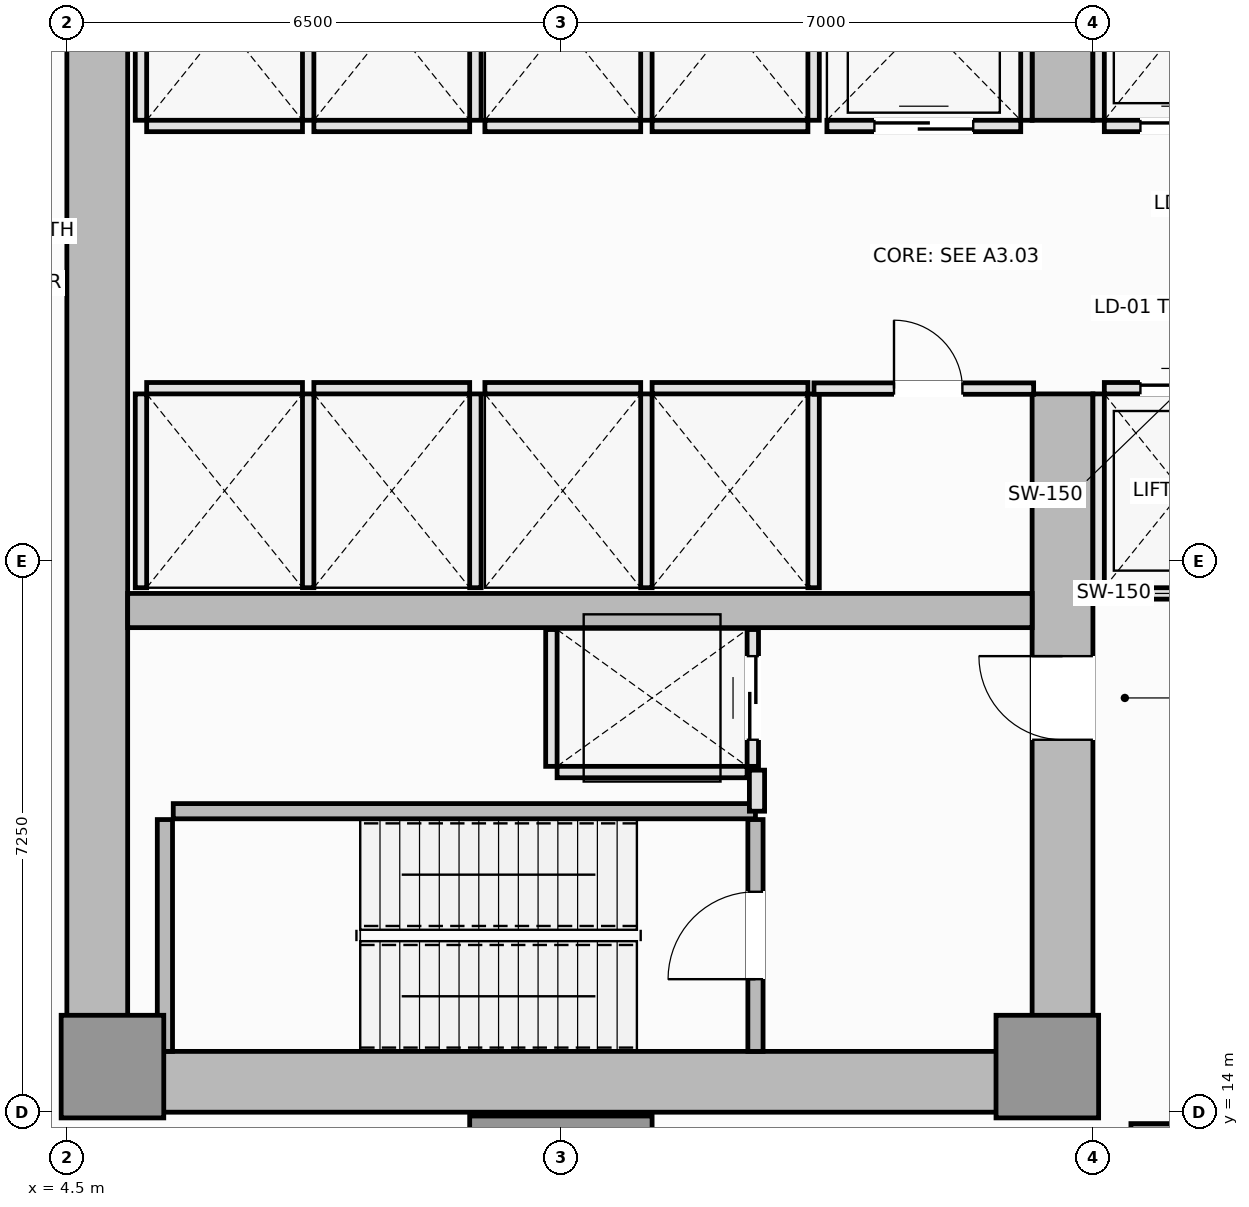
"""IFC4 building model, lengths in metres.
Left out: names, types, materials, properties, quantities, classifications, styles, units other than length and angle.
Written with IfcOpenShell. Run it as: python <this file> out.ifc"""

import sys

from ifc_helpers import new_model, si_unit, direction, frame, frame_2d, origin, origin_2d, place, context, subcontext, project, spatial, rectangle, extrude, element, fill, save


model = new_model("IFC4")
c1 = context("Model", 3, precision=1e-05, world=origin(), true_north=direction((0.0, 1.0)))
c2 = subcontext(c1, "Body", "Model", "MODEL_VIEW")
j1 = project(units=[si_unit("LENGTHUNIT", "METRE"), si_unit("PLANEANGLEUNIT", "RADIAN")], contexts=[c1])
p1 = place(None, origin())
s1 = spatial("IfcSite", under=j1, at=p1, CompositionType="ELEMENT")
p2 = place(p1, origin())
s2 = spatial("IfcBuilding", under=s1, at=p2, CompositionType="ELEMENT")
p3 = place(p2, frame((0.0, 0.0, 15.6)))
s3 = spatial("IfcBuildingStorey", under=s2, at=p3, CompositionType="ELEMENT", Elevation=15.6)
p4 = place(p3, frame((4.5, 14.4, 0.0), z_axis=(0.0, 0.0, 1.0), x_axis=(1.0, 0.0, 0.0)))
e1 = element("IfcWall", 1, at=p4, inside=s3, PredefinedType="SHEAR", context=c2, shape_type="SweptSolid", body=[
    extrude(rectangle(XDim=13.5, YDim=0.8, at=frame_2d((6.75, 0.0))), origin(), (0.0, 0.0, 1.0), 4.8),
])
p5 = place(p3, frame((4.9, 14.8, 0.0), z_axis=(0.0, 0.0, 1.0), x_axis=(0.0, 1.0, 0.0)))
e2 = element("IfcWall", 2, at=p5, inside=s3, PredefinedType="SHEAR", context=c2, shape_type="SweptSolid", body=[
    extrude(rectangle(XDim=20.9, YDim=0.8, at=frame_2d((10.45, 0.0))), origin(), (0.0, 0.0, 1.0), 4.8),
])
p6 = place(p3, frame((17.6, 14.8, 0.0), z_axis=(0.0, 0.0, 1.0), x_axis=(0.0, 1.0, 0.0)))
e3 = element("IfcWall", 3, at=p6, inside=s3, PredefinedType="SHEAR", context=c2, shape_type="SweptSolid", body=[
    extrude(rectangle(XDim=8.65, YDim=0.8, at=frame_2d((4.325, 0.0))), origin(), (0.0, 0.0, 1.0), 4.8),
])
p7 = place(p6, frame((4.1, 0.0, 0.0)))
e4 = element("IfcOpeningElement", 4, at=p7, cuts=e3, PredefinedType="OPENING", context=c2, shape_type="SweptSolid", body=[
    extrude(rectangle(XDim=1.1, YDim=2.15, at=frame_2d((0.55, 1.075))), frame((0.0, 0.41, 0.0), z_axis=(0.0, -1.0, 0.0), x_axis=(1.0, 0.0, 0.0)), (0.0, 0.0, 1.0), 0.82),
])
p8 = place(p3, frame((17.6, 27.05, 0.0), z_axis=(0.0, 0.0, 1.0), x_axis=(0.0, 1.0, 0.0)))
e5 = element("IfcWall", 5, at=p8, inside=s3, PredefinedType="SHEAR", context=c2, shape_type="SweptSolid", body=[
    extrude(rectangle(XDim=8.65, YDim=0.8, at=frame_2d((4.325, 0.0))), origin(), (0.0, 0.0, 1.0), 4.8),
])
p9 = place(p8, frame((3.45, 0.0, 0.0)))
e6 = element("IfcOpeningElement", 6, at=p9, cuts=e5, PredefinedType="OPENING", context=c2, shape_type="SweptSolid", body=[
    extrude(rectangle(XDim=1.1, YDim=2.15, at=frame_2d((0.55, 1.075))), frame((0.0, 0.41, 0.0), z_axis=(0.0, -1.0, 0.0), x_axis=(1.0, 0.0, 0.0)), (0.0, 0.0, 1.0), 0.82),
])
p10 = place(p3, frame((5.3, 20.6, 0.0), z_axis=(0.0, 0.0, 1.0), x_axis=(1.0, 0.0, 0.0)))
e7 = element("IfcWall", 7, at=p10, inside=s3, PredefinedType="SHEAR", context=c2, shape_type="SweptSolid", body=[
    extrude(rectangle(XDim=11.9, YDim=0.45, at=frame_2d((5.95, 0.0))), origin(), (0.0, 0.0, 1.0), 4.8),
])
for number, where, z_axis, x_axis in (
    (8, (5.1, 14.6, 0.0), (0.0, 0.0, 1.0), (1.0, 0.0, 0.0)),
    (9, (17.4, 14.6, 0.0), (0.0, 0.0, 1.0), (1.0, 0.0, 0.0)),
):
    element("IfcColumn", number, at=place(p3, frame(where, z_axis=z_axis, x_axis=x_axis)), inside=s3, PredefinedType="PILASTER", context=c2, shape_type="SweptSolid", body=[
        extrude(rectangle(XDim=1.35, YDim=1.35, at=origin_2d()), origin(), (0.0, 0.0, 1.0), 4.8),
    ])
p11 = place(p3, frame((11.0, 12.75, 0.0), z_axis=(0.0, 0.0, 1.0), x_axis=(1.0, 0.0, 0.0)))
e10 = element("IfcColumn", 10, at=p11, inside=s3, PredefinedType="COLUMN", context=c2, shape_type="SweptSolid", body=[
    extrude(rectangle(XDim=2.4, YDim=2.4, at=origin_2d()), origin(), (0.0, 0.0, 1.0), 4.8),
])
p12 = place(p3, frame((19.8, 12.75, 0.0), z_axis=(0.0, 0.0, 1.0), x_axis=(1.0, 0.0, 0.0)))
e11 = element("IfcColumn", 11, at=p12, inside=s3, PredefinedType="COLUMN", context=c2, shape_type="SweptSolid", body=[
    extrude(rectangle(XDim=2.6, YDim=2.2, at=origin_2d()), origin(), (0.0, 0.0, 1.0), 4.8),
])
p13 = place(p3, frame((5.79, 14.8, 0.0), z_axis=(0.0, 0.0, 1.0), x_axis=(0.0, 1.0, 0.0)))
e12 = element("IfcWall", 12, at=p13, inside=s3, PredefinedType="SOLIDWALL", context=c2, shape_type="SweptSolid", body=[
    extrude(rectangle(XDim=3.05, YDim=0.2, at=frame_2d((1.525, 0.0))), origin(), (0.0, 0.0, 1.0), 4.8),
])
p14 = place(p3, frame((5.9, 17.96, 0.0), z_axis=(0.0, 0.0, 1.0), x_axis=(1.0, 0.0, 0.0)))
e13 = element("IfcWall", 13, at=p14, inside=s3, PredefinedType="SOLIDWALL", context=c2, shape_type="SweptSolid", body=[
    extrude(rectangle(XDim=7.66, YDim=0.2, at=frame_2d((3.83, 0.0))), origin(), (0.0, 0.0, 1.0), 4.8),
])
p15 = place(p3, frame((13.56, 14.8, 0.0), z_axis=(0.0, 0.0, 1.0), x_axis=(0.0, 1.0, 0.0)))
e14 = element("IfcWall", 14, at=p15, inside=s3, PredefinedType="SOLIDWALL", context=c2, shape_type="SweptSolid", body=[
    extrude(rectangle(XDim=3.05, YDim=0.2, at=frame_2d((1.525, 0.0))), origin(), (0.0, 0.0, 1.0), 4.8),
])
p16 = place(p15, frame((0.95, 0.0, 0.0)))
e15 = element("IfcOpeningElement", 15, at=p16, cuts=e14, PredefinedType="OPENING", context=c2, shape_type="SweptSolid", body=[
    extrude(rectangle(XDim=1.15, YDim=2.15, at=frame_2d((0.575, 1.075))), frame((0.0, 0.11, 0.0), z_axis=(0.0, -1.0, 0.0), x_axis=(1.0, 0.0, 0.0)), (0.0, 0.0, 1.0), 0.22),
])
p17 = place(p3, frame((18.15, 20.825, 0.0), z_axis=(0.0, 0.0, 1.0), x_axis=(1.0, 0.0, 0.0)))
e16 = element("IfcWall", 16, at=p17, inside=s3, PredefinedType="PARTITIONING", context=c2, shape_type="SweptSolid", body=[
    extrude(rectangle(XDim=2.05, YDim=0.15, at=frame_2d((1.025, 0.0))), origin(), (0.0, 0.0, 1.0), 4.6),
])
p18 = place(p3, frame((18.15, 23.525, 0.0), z_axis=(0.0, 0.0, 1.0), x_axis=(1.0, 0.0, 0.0)))
e17 = element("IfcWall", 17, at=p18, inside=s3, PredefinedType="PARTITIONING", context=c2, shape_type="SweptSolid", body=[
    extrude(rectangle(XDim=2.05, YDim=0.15, at=frame_2d((1.025, 0.0))), origin(), (0.0, 0.0, 1.0), 4.6),
])
p19 = place(p18, frame((0.475, 0.0, 0.0)))
e18 = element("IfcOpeningElement", 18, at=p19, cuts=e17, PredefinedType="OPENING", context=c2, shape_type="SweptSolid", body=[
    extrude(rectangle(XDim=1.1, YDim=2.2, at=frame_2d((0.55, 1.1))), frame((0.0, 0.085, 0.0), z_axis=(0.0, -1.0, 0.0), x_axis=(1.0, 0.0, 0.0)), (0.0, 0.0, 1.0), 0.17),
])
p20 = place(p3, frame((18.075, 20.9, 0.0), z_axis=(0.0, 0.0, 1.0), x_axis=(0.0, 1.0, 0.0)))
e19 = element("IfcWall", 19, at=p20, inside=s3, PredefinedType="PARTITIONING", context=c2, shape_type="SweptSolid", body=[
    extrude(rectangle(XDim=2.55, YDim=0.15, at=frame_2d((1.275, 0.0))), origin(), (0.0, 0.0, 1.0), 4.6),
])
p21 = place(p3, frame((18.15, 26.975, 0.0), z_axis=(0.0, 0.0, 1.0), x_axis=(1.0, 0.0, 0.0)))
e20 = element("IfcWall", 20, at=p21, inside=s3, PredefinedType="PARTITIONING", context=c2, shape_type="SweptSolid", body=[
    extrude(rectangle(XDim=2.05, YDim=0.15, at=frame_2d((1.025, 0.0))), origin(), (0.0, 0.0, 1.0), 4.6),
])
p22 = place(p21, frame((0.475, 0.0, 0.0)))
e21 = element("IfcOpeningElement", 21, at=p22, cuts=e20, PredefinedType="OPENING", context=c2, shape_type="SweptSolid", body=[
    extrude(rectangle(XDim=1.1, YDim=2.2, at=frame_2d((0.55, 1.1))), frame((0.0, 0.085, 0.0), z_axis=(0.0, -1.0, 0.0), x_axis=(1.0, 0.0, 0.0)), (0.0, 0.0, 1.0), 0.17),
])
p23 = place(p3, frame((18.075, 27.05, 0.0), z_axis=(0.0, 0.0, 1.0), x_axis=(0.0, 1.0, 0.0)))
e22 = element("IfcWall", 22, at=p23, inside=s3, PredefinedType="PARTITIONING", context=c2, shape_type="SweptSolid", body=[
    extrude(rectangle(XDim=2.55, YDim=0.15, at=frame_2d((1.275, 0.0))), origin(), (0.0, 0.0, 1.0), 4.6),
])
p24 = place(p3, frame((5.55, 23.525, 0.0), z_axis=(0.0, 0.0, 1.0), x_axis=(1.0, 0.0, 0.0)))
e23 = element("IfcWall", 23, at=p24, inside=s3, PredefinedType="PARTITIONING", context=c2, shape_type="SweptSolid", body=[
    extrude(rectangle(XDim=2.05, YDim=0.15, at=frame_2d((1.025, 0.0))), origin(), (0.0, 0.0, 1.0), 4.6),
])
for number, where, z_axis, x_axis in (
    (24, (5.475, 20.9, 0.0), (0.0, 0.0, 1.0), (0.0, 1.0, 0.0)),
    (25, (7.675, 20.9, 0.0), (0.0, 0.0, 1.0), (0.0, 1.0, 0.0)),
):
    element("IfcWall", number, at=place(p3, frame(where, z_axis=z_axis, x_axis=x_axis)), inside=s3, PredefinedType="PARTITIONING", context=c2, shape_type="SweptSolid", body=[
        extrude(rectangle(XDim=2.55, YDim=0.15, at=frame_2d((1.275, 0.0))), origin(), (0.0, 0.0, 1.0), 4.6),
    ])
p25 = place(p3, frame((7.75, 23.525, 0.0), z_axis=(0.0, 0.0, 1.0), x_axis=(1.0, 0.0, 0.0)))
e26 = element("IfcWall", 26, at=p25, inside=s3, PredefinedType="PARTITIONING", context=c2, shape_type="SweptSolid", body=[
    extrude(rectangle(XDim=2.05, YDim=0.15, at=frame_2d((1.025, 0.0))), origin(), (0.0, 0.0, 1.0), 4.6),
])
p26 = place(p3, frame((9.875, 20.9, 0.0), z_axis=(0.0, 0.0, 1.0), x_axis=(0.0, 1.0, 0.0)))
e27 = element("IfcWall", 27, at=p26, inside=s3, PredefinedType="PARTITIONING", context=c2, shape_type="SweptSolid", body=[
    extrude(rectangle(XDim=2.55, YDim=0.15, at=frame_2d((1.275, 0.0))), origin(), (0.0, 0.0, 1.0), 4.6),
])
p27 = place(p3, frame((5.55, 26.975, 0.0), z_axis=(0.0, 0.0, 1.0), x_axis=(1.0, 0.0, 0.0)))
e28 = element("IfcWall", 28, at=p27, inside=s3, PredefinedType="PARTITIONING", context=c2, shape_type="SweptSolid", body=[
    extrude(rectangle(XDim=2.05, YDim=0.15, at=frame_2d((1.025, 0.0))), origin(), (0.0, 0.0, 1.0), 4.6),
])
for number, where, z_axis, x_axis in (
    (29, (5.475, 27.05, 0.0), (0.0, 0.0, 1.0), (0.0, 1.0, 0.0)),
    (30, (7.675, 27.05, 0.0), (0.0, 0.0, 1.0), (0.0, 1.0, 0.0)),
):
    element("IfcWall", number, at=place(p3, frame(where, z_axis=z_axis, x_axis=x_axis)), inside=s3, PredefinedType="PARTITIONING", context=c2, shape_type="SweptSolid", body=[
        extrude(rectangle(XDim=2.55, YDim=0.15, at=frame_2d((1.275, 0.0))), origin(), (0.0, 0.0, 1.0), 4.6),
    ])
p28 = place(p3, frame((7.75, 26.975, 0.0), z_axis=(0.0, 0.0, 1.0), x_axis=(1.0, 0.0, 0.0)))
e31 = element("IfcWall", 31, at=p28, inside=s3, PredefinedType="PARTITIONING", context=c2, shape_type="SweptSolid", body=[
    extrude(rectangle(XDim=2.05, YDim=0.15, at=frame_2d((1.025, 0.0))), origin(), (0.0, 0.0, 1.0), 4.6),
])
p29 = place(p3, frame((9.875, 27.05, 0.0), z_axis=(0.0, 0.0, 1.0), x_axis=(0.0, 1.0, 0.0)))
e32 = element("IfcWall", 32, at=p29, inside=s3, PredefinedType="PARTITIONING", context=c2, shape_type="SweptSolid", body=[
    extrude(rectangle(XDim=2.55, YDim=0.15, at=frame_2d((1.275, 0.0))), origin(), (0.0, 0.0, 1.0), 4.6),
])
p30 = place(p3, frame((10.0, 23.525, 0.0), z_axis=(0.0, 0.0, 1.0), x_axis=(1.0, 0.0, 0.0)))
e33 = element("IfcWall", 33, at=p30, inside=s3, PredefinedType="PARTITIONING", context=c2, shape_type="SweptSolid", body=[
    extrude(rectangle(XDim=2.05, YDim=0.15, at=frame_2d((1.025, 0.0))), origin(), (0.0, 0.0, 1.0), 4.6),
])
p31 = place(p3, frame((12.125, 20.9, 0.0), z_axis=(0.0, 0.0, 1.0), x_axis=(0.0, 1.0, 0.0)))
e34 = element("IfcWall", 34, at=p31, inside=s3, PredefinedType="PARTITIONING", context=c2, shape_type="SweptSolid", body=[
    extrude(rectangle(XDim=2.55, YDim=0.15, at=frame_2d((1.275, 0.0))), origin(), (0.0, 0.0, 1.0), 4.6),
])
p32 = place(p3, frame((12.2, 23.525, 0.0), z_axis=(0.0, 0.0, 1.0), x_axis=(1.0, 0.0, 0.0)))
e35 = element("IfcWall", 35, at=p32, inside=s3, PredefinedType="PARTITIONING", context=c2, shape_type="SweptSolid", body=[
    extrude(rectangle(XDim=2.05, YDim=0.15, at=frame_2d((1.025, 0.0))), origin(), (0.0, 0.0, 1.0), 4.6),
])
p33 = place(p3, frame((14.325, 20.9, 0.0), z_axis=(0.0, 0.0, 1.0), x_axis=(0.0, 1.0, 0.0)))
e36 = element("IfcWall", 36, at=p33, inside=s3, PredefinedType="PARTITIONING", context=c2, shape_type="SweptSolid", body=[
    extrude(rectangle(XDim=2.55, YDim=0.15, at=frame_2d((1.275, 0.0))), origin(), (0.0, 0.0, 1.0), 4.6),
])
p34 = place(p3, frame((10.0, 26.975, 0.0), z_axis=(0.0, 0.0, 1.0), x_axis=(1.0, 0.0, 0.0)))
e37 = element("IfcWall", 37, at=p34, inside=s3, PredefinedType="PARTITIONING", context=c2, shape_type="SweptSolid", body=[
    extrude(rectangle(XDim=2.05, YDim=0.15, at=frame_2d((1.025, 0.0))), origin(), (0.0, 0.0, 1.0), 4.6),
])
p35 = place(p3, frame((12.125, 27.05, 0.0), z_axis=(0.0, 0.0, 1.0), x_axis=(0.0, 1.0, 0.0)))
e38 = element("IfcWall", 38, at=p35, inside=s3, PredefinedType="PARTITIONING", context=c2, shape_type="SweptSolid", body=[
    extrude(rectangle(XDim=2.55, YDim=0.15, at=frame_2d((1.275, 0.0))), origin(), (0.0, 0.0, 1.0), 4.6),
])
p36 = place(p3, frame((12.2, 26.975, 0.0), z_axis=(0.0, 0.0, 1.0), x_axis=(1.0, 0.0, 0.0)))
e39 = element("IfcWall", 39, at=p36, inside=s3, PredefinedType="PARTITIONING", context=c2, shape_type="SweptSolid", body=[
    extrude(rectangle(XDim=2.05, YDim=0.15, at=frame_2d((1.025, 0.0))), origin(), (0.0, 0.0, 1.0), 4.6),
])
p37 = place(p3, frame((14.325, 27.05, 0.0), z_axis=(0.0, 0.0, 1.0), x_axis=(0.0, 1.0, 0.0)))
e40 = element("IfcWall", 40, at=p37, inside=s3, PredefinedType="PARTITIONING", context=c2, shape_type="SweptSolid", body=[
    extrude(rectangle(XDim=2.55, YDim=0.15, at=frame_2d((1.275, 0.0))), origin(), (0.0, 0.0, 1.0), 4.6),
])
p38 = place(p3, frame((14.5, 26.975, 0.0), z_axis=(0.0, 0.0, 1.0), x_axis=(1.0, 0.0, 0.0)))
e41 = element("IfcWall", 41, at=p38, inside=s3, PredefinedType="PARTITIONING", context=c2, shape_type="SweptSolid", body=[
    extrude(rectangle(XDim=2.55, YDim=0.15, at=frame_2d((1.275, 0.0))), origin(), (0.0, 0.0, 1.0), 4.6),
])
p39 = place(p38, frame((0.625, 0.0, 0.0)))
e42 = element("IfcOpeningElement", 42, at=p39, cuts=e41, PredefinedType="OPENING", context=c2, shape_type="SweptSolid", body=[
    extrude(rectangle(XDim=1.3, YDim=2.2, at=frame_2d((0.65, 1.1))), frame((0.0, 0.085, 0.0), z_axis=(0.0, -1.0, 0.0), x_axis=(1.0, 0.0, 0.0)), (0.0, 0.0, 1.0), 0.17),
])
p40 = place(p3, frame((17.125, 27.05, 0.0), z_axis=(0.0, 0.0, 1.0), x_axis=(0.0, 1.0, 0.0)))
e43 = element("IfcWall", 43, at=p40, inside=s3, PredefinedType="PARTITIONING", context=c2, shape_type="SweptSolid", body=[
    extrude(rectangle(XDim=2.6, YDim=0.15, at=frame_2d((1.3, 0.0))), origin(), (0.0, 0.0, 1.0), 4.6),
])
p41 = place(p3, frame((10.95, 18.475, 0.0), z_axis=(0.0, 0.0, 1.0), x_axis=(1.0, 0.0, 0.0)))
e44 = element("IfcWall", 44, at=p41, inside=s3, PredefinedType="PARTITIONING", context=c2, shape_type="SweptSolid", body=[
    extrude(rectangle(XDim=2.5, YDim=0.15, at=frame_2d((1.25, 0.0))), origin(), (0.0, 0.0, 1.0), 4.6),
])
p42 = place(p3, frame((10.875, 18.55, 0.0), z_axis=(0.0, 0.0, 1.0), x_axis=(0.0, 1.0, 0.0)))
e45 = element("IfcWall", 45, at=p42, inside=s3, PredefinedType="PARTITIONING", context=c2, shape_type="SweptSolid", body=[
    extrude(rectangle(XDim=1.8, YDim=0.15, at=frame_2d((0.9, 0.0))), origin(), (0.0, 0.0, 1.0), 4.6),
])
p43 = place(p3, frame((13.525, 18.55, 0.0), z_axis=(0.0, 0.0, 1.0), x_axis=(0.0, 1.0, 0.0)))
e46 = element("IfcWall", 46, at=p43, inside=s3, PredefinedType="PARTITIONING", context=c2, shape_type="SweptSolid", body=[
    extrude(rectangle(XDim=1.8, YDim=0.15, at=frame_2d((0.9, 0.0))), origin(), (0.0, 0.0, 1.0), 4.6),
])
p44 = place(p43, frame((0.35, 0.0, 0.0)))
e47 = element("IfcOpeningElement", 47, at=p44, cuts=e46, PredefinedType="OPENING", context=c2, shape_type="SweptSolid", body=[
    extrude(rectangle(XDim=1.1, YDim=2.2, at=frame_2d((0.55, 1.1))), frame((0.0, 0.085, 0.0), z_axis=(0.0, -1.0, 0.0), x_axis=(1.0, 0.0, 0.0)), (0.0, 0.0, 1.0), 0.17),
])
p45 = place(p3, frame((13.58, 17.96, 0.0), z_axis=(0.0, 0.0, 1.0), x_axis=(0.0, 1.0, 0.0)))
e48 = element("IfcWall", 48, at=p45, inside=s3, PredefinedType="PARTITIONING", context=c2, shape_type="SweptSolid", body=[
    extrude(rectangle(XDim=0.54, YDim=0.2, at=frame_2d((0.27, 0.0))), origin(), (0.0, 0.0, 1.0), 4.6),
])
p46 = place(p3, frame((14.33, 23.52, 0.0), z_axis=(0.0, 0.0, 1.0), x_axis=(1.0, 0.0, 0.0)))
e49 = element("IfcWall", 49, at=p46, inside=s3, PredefinedType="PARTITIONING", context=c2, shape_type="SweptSolid", body=[
    extrude(rectangle(XDim=2.89, YDim=0.15, at=frame_2d((1.445, 0.0))), origin(), (0.0, 0.0, 1.0), 4.6),
])
p47 = place(p46, frame((1.053, 0.0, 0.0)))
e50 = element("IfcOpeningElement", 50, at=p47, cuts=e49, PredefinedType="OPENING", context=c2, shape_type="SweptSolid", body=[
    extrude(rectangle(XDim=0.9, YDim=2.1, at=frame_2d((0.45, 1.05))), frame((0.0, 0.085, 0.0), z_axis=(0.0, -1.0, 0.0), x_axis=(1.0, 0.0, 0.0)), (0.0, 0.0, 1.0), 0.17),
])
p48 = place(p16, origin())
e51 = element("IfcDoor", 51, at=p48, inside=s3, OperationType="SINGLE_SWING_LEFT", PredefinedType="DOOR", context=c2, shape_type="SweptSolid", body=[
    extrude(rectangle(XDim=1.15, YDim=2.15, at=frame_2d((0.575, 1.075))), frame((0.0, 0.025, 0.0), z_axis=(0.0, -1.0, 0.0), x_axis=(1.0, 0.0, 0.0)), (0.0, 0.0, 1.0), 0.05),
])
fill(e15, e51)
p49 = place(p19, origin())
e52 = element("IfcDoor", 52, at=p49, inside=s3, OperationType="DOUBLE_DOOR_SLIDING", PredefinedType="DOOR", context=c2, shape_type="SweptSolid", body=[
    extrude(rectangle(XDim=1.1, YDim=2.2, at=frame_2d((0.55, 1.1))), frame((0.0, 0.025, 0.0), z_axis=(0.0, -1.0, 0.0), x_axis=(1.0, 0.0, 0.0)), (0.0, 0.0, 1.0), 0.05),
])
fill(e18, e52)
p50 = place(p22, origin())
e53 = element("IfcDoor", 53, at=p50, inside=s3, OperationType="DOUBLE_DOOR_SLIDING", PredefinedType="DOOR", context=c2, shape_type="SweptSolid", body=[
    extrude(rectangle(XDim=1.1, YDim=2.2, at=frame_2d((0.55, 1.1))), frame((0.0, 0.025, 0.0), z_axis=(0.0, -1.0, 0.0), x_axis=(1.0, 0.0, 0.0)), (0.0, 0.0, 1.0), 0.05),
])
fill(e21, e53)
p51 = place(p39, origin())
e54 = element("IfcDoor", 54, at=p51, inside=s3, OperationType="DOUBLE_DOOR_SLIDING", PredefinedType="DOOR", context=c2, shape_type="SweptSolid", body=[
    extrude(rectangle(XDim=1.3, YDim=2.2, at=frame_2d((0.65, 1.1))), frame((0.0, 0.025, 0.0), z_axis=(0.0, -1.0, 0.0), x_axis=(1.0, 0.0, 0.0)), (0.0, 0.0, 1.0), 0.05),
])
fill(e42, e54)
p52 = place(p44, origin())
e55 = element("IfcDoor", 55, at=p52, inside=s3, OperationType="DOUBLE_DOOR_SLIDING", PredefinedType="DOOR", context=c2, shape_type="SweptSolid", body=[
    extrude(rectangle(XDim=1.1, YDim=2.2, at=frame_2d((0.55, 1.1))), frame((0.0, 0.025, 0.0), z_axis=(0.0, -1.0, 0.0), x_axis=(1.0, 0.0, 0.0)), (0.0, 0.0, 1.0), 0.05),
])
fill(e47, e55)
p53 = place(p7, origin())
e56 = element("IfcDoor", 56, at=p53, inside=s3, OperationType="SINGLE_SWING_RIGHT", PredefinedType="DOOR", context=c2, shape_type="SweptSolid", body=[
    extrude(rectangle(XDim=1.1, YDim=2.15, at=frame_2d((0.55, 1.075))), frame((0.0, 0.025, 0.0), z_axis=(0.0, -1.0, 0.0), x_axis=(1.0, 0.0, 0.0)), (0.0, 0.0, 1.0), 0.05),
])
fill(e4, e56)
p54 = place(p47, origin())
e57 = element("IfcDoor", 57, at=p54, inside=s3, OperationType="SINGLE_SWING_LEFT", PredefinedType="DOOR", context=c2, shape_type="SweptSolid", body=[
    extrude(rectangle(XDim=0.9, YDim=2.1, at=frame_2d((0.45, 1.05))), frame((0.0, 0.025, 0.0), z_axis=(0.0, -1.0, 0.0), x_axis=(1.0, 0.0, 0.0)), (0.0, 0.0, 1.0), 0.05),
])
fill(e50, e57)
save(model, sys.argv[1])
